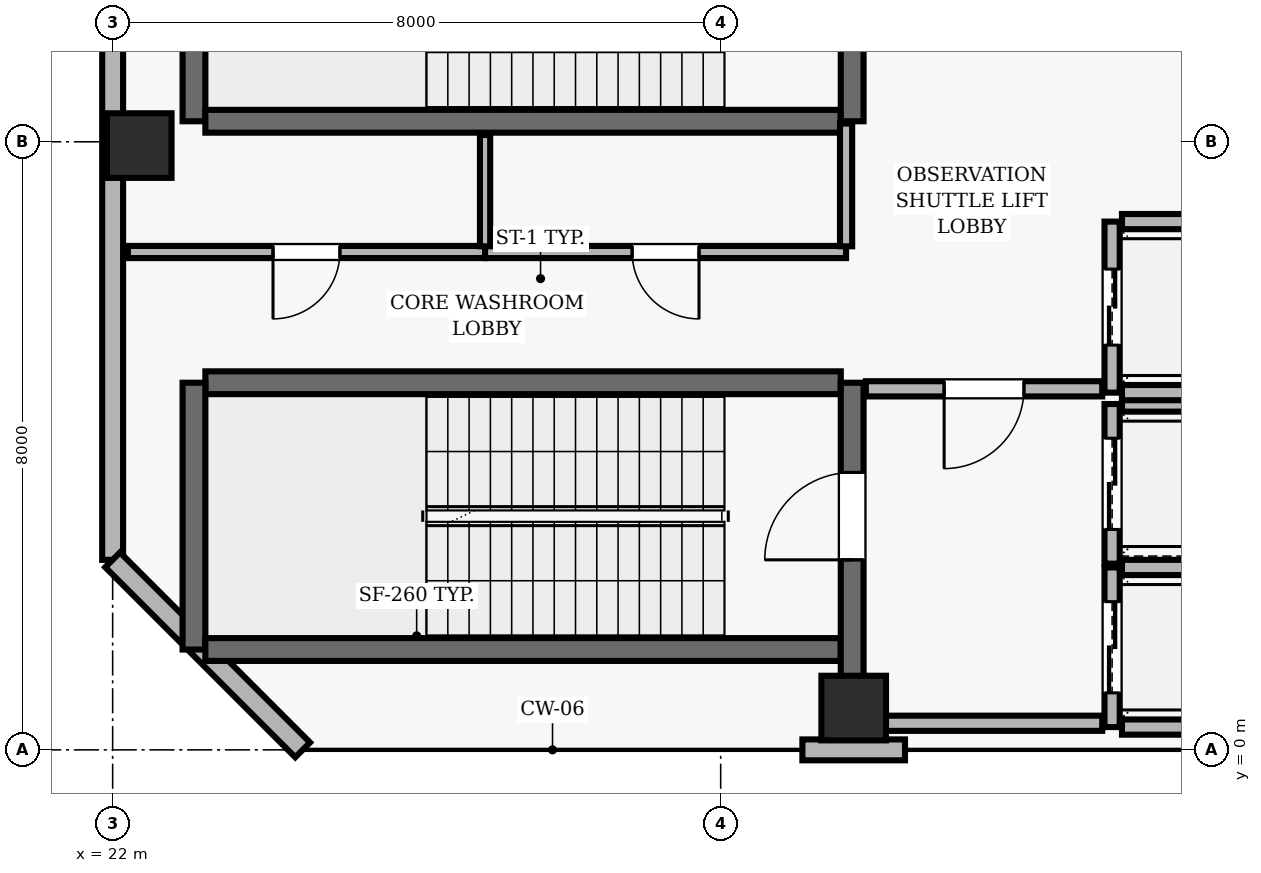
"""IFC4 building model, lengths in metres.
Left out: names, types, materials, properties, quantities, classifications, styles, units other than length and angle.
Written with IfcOpenShell. Run it as: python <this file> out.ifc"""

import sys

from ifc_helpers import new_model, si_unit, direction, frame, frame_2d, origin, origin_2d, place, context, subcontext, project, spatial, rectangle, extrude, element, fill, save


model = new_model("IFC4")
c1 = context("Model", 3, precision=1e-05, world=origin(), true_north=direction((0.0, 1.0)))
c2 = subcontext(c1, "Body", "Model", "MODEL_VIEW")
j1 = project(units=[si_unit("LENGTHUNIT", "METRE"), si_unit("PLANEANGLEUNIT", "RADIAN")], contexts=[c1])
p1 = place(None, origin())
s1 = spatial("IfcSite", under=j1, at=p1, CompositionType="ELEMENT")
p2 = place(p1, origin())
s2 = spatial("IfcBuilding", under=s1, at=p2, CompositionType="ELEMENT")
p3 = place(p2, frame((0.0, 0.0, 311.7)))
s3 = spatial("IfcBuildingStorey", under=s2, at=p3, CompositionType="ELEMENT", Elevation=311.7)
for number, where, z_axis, x_axis in (
    (1, (31.75, 0.55, 0.0), (0.0, 0.0, 1.0), (1.0, 0.0, 0.0)),
    (2, (22.35, 7.95, 0.0), (0.0, 0.0, 1.0), (1.0, 0.0, 0.0)),
):
    element("IfcColumn", number, at=place(p3, frame(where, z_axis=z_axis, x_axis=x_axis)), inside=s3, PredefinedType="COLUMN", context=c2, shape_type="SweptSolid", body=[
        extrude(rectangle(XDim=0.85, YDim=0.85, at=origin_2d()), origin(), (0.0, 0.0, 1.0), 5.0),
    ])
p4 = place(p3, frame((31.075, 0.0, 0.0), z_axis=(0.0, 0.0, 1.0), x_axis=(1.0, 0.0, 0.0)))
e3 = element("IfcWall", 3, at=p4, inside=s3, PredefinedType="SOLIDWALL", context=c2, shape_type="SweptSolid", body=[
    extrude(rectangle(XDim=1.35, YDim=0.275, at=frame_2d((0.675, 0.0))), origin(), (0.0, 0.0, 1.0), 4.74),
])
p5 = place(p3, frame((22.0, 35.3, 0.0), z_axis=(0.0, 0.0, 1.0), x_axis=(0.0, -1.0, 0.0)))
e4 = element("IfcWall", 4, at=p5, inside=s3, PredefinedType="SOLIDWALL", context=c2, shape_type="SweptSolid", body=[
    extrude(rectangle(XDim=32.8, YDim=0.275, at=frame_2d((16.4, 0.0))), origin(), (0.0, 0.0, 1.0), 4.74),
])
p6 = place(p5, frame((7.3, 0.0, 0.0)))
e5 = element("IfcOpeningElement", 5, at=p6, cuts=e4, PredefinedType="OPENING", context=c2, shape_type="SweptSolid", body=[
    extrude(rectangle(XDim=1.0, YDim=2.2, at=frame_2d((0.5, 1.1))), frame((0.0, 0.147, 0.0), z_axis=(0.0, -1.0, 0.0), x_axis=(1.0, 0.0, 0.0)), (0.0, 0.0, 1.0), 0.295),
])
p7 = place(p5, frame((1.533, 0.0, 0.9)))
e6 = element("IfcOpeningElement", 6, at=p7, cuts=e4, PredefinedType="OPENING", context=c2, shape_type="SweptSolid", body=[
    extrude(rectangle(XDim=2.4, YDim=1.6, at=frame_2d((1.2, 0.8))), frame((0.0, 0.147, 0.0), z_axis=(0.0, -1.0, 0.0), x_axis=(1.0, 0.0, 0.0)), (0.0, 0.0, 1.0), 0.295),
])
p8 = place(p5, frame((12.917, 0.0, 0.9)))
e7 = element("IfcOpeningElement", 7, at=p8, cuts=e4, PredefinedType="OPENING", context=c2, shape_type="SweptSolid", body=[
    extrude(rectangle(XDim=2.4, YDim=1.6, at=frame_2d((1.2, 0.8))), frame((0.0, 0.147, 0.0), z_axis=(0.0, -1.0, 0.0), x_axis=(1.0, 0.0, 0.0)), (0.0, 0.0, 1.0), 0.295),
])
p9 = place(p5, frame((17.483, 0.0, 0.9)))
e8 = element("IfcOpeningElement", 8, at=p9, cuts=e4, PredefinedType="OPENING", context=c2, shape_type="SweptSolid", body=[
    extrude(rectangle(XDim=2.4, YDim=1.6, at=frame_2d((1.2, 0.8))), frame((0.0, 0.147, 0.0), z_axis=(0.0, -1.0, 0.0), x_axis=(1.0, 0.0, 0.0)), (0.0, 0.0, 1.0), 0.295),
])
p10 = place(p5, frame((23.4, 0.0, 0.9)))
e9 = element("IfcOpeningElement", 9, at=p10, cuts=e4, PredefinedType="OPENING", context=c2, shape_type="SweptSolid", body=[
    extrude(rectangle(XDim=2.4, YDim=1.6, at=frame_2d((1.2, 0.8))), frame((0.0, 0.147, 0.0), z_axis=(0.0, -1.0, 0.0), x_axis=(1.0, 0.0, 0.0)), (0.0, 0.0, 1.0), 0.295),
])
p11 = place(p3, frame((22.0, 2.5, 0.0), z_axis=(0.0, 0.0, 1.0), x_axis=(0.707106781187, -0.707106781187, 0.0)))
e10 = element("IfcWall", 10, at=p11, inside=s3, PredefinedType="SOLIDWALL", context=c2, shape_type="SweptSolid", body=[
    extrude(rectangle(XDim=3.536, YDim=0.275, at=frame_2d((1.768, 0.0))), origin(), (0.0, 0.0, 1.0), 4.74),
])
p12 = place(p3, frame((31.58, 4.83, 0.0), z_axis=(0.0, 0.0, 1.0), x_axis=(-1.0, 0.0, 0.0)))
e11 = element("IfcWall", 11, at=p12, inside=s3, PredefinedType="SHEAR", context=c2, shape_type="SweptSolid", body=[
    extrude(rectangle(XDim=8.36, YDim=0.3, at=frame_2d((4.18, 0.0))), origin(), (0.0, 0.0, 1.0), 4.74),
])
p13 = place(p3, frame((23.07, 4.83, 0.0), z_axis=(0.0, 0.0, 1.0), x_axis=(0.0, -1.0, 0.0)))
e12 = element("IfcWall", 12, at=p13, inside=s3, PredefinedType="SHEAR", context=c2, shape_type="SweptSolid", body=[
    extrude(rectangle(XDim=3.51, YDim=0.3, at=frame_2d((1.755, 0.0))), origin(), (0.0, 0.0, 1.0), 4.74),
])
p14 = place(p3, frame((23.22, 1.32, 0.0), z_axis=(0.0, 0.0, 1.0), x_axis=(1.0, 0.0, 0.0)))
e13 = element("IfcWall", 13, at=p14, inside=s3, PredefinedType="SHEAR", context=c2, shape_type="SweptSolid", body=[
    extrude(rectangle(XDim=8.36, YDim=0.3, at=frame_2d((4.18, 0.0))), origin(), (0.0, 0.0, 1.0), 4.74),
])
p15 = place(p3, frame((31.73, 0.96, 0.0), z_axis=(0.0, 0.0, 1.0), x_axis=(0.0, 1.0, 0.0)))
e14 = element("IfcWall", 14, at=p15, inside=s3, PredefinedType="SHEAR", context=c2, shape_type="SweptSolid", body=[
    extrude(rectangle(XDim=3.87, YDim=0.3, at=frame_2d((1.935, 0.0))), origin(), (0.0, 0.0, 1.0), 4.74),
])
p16 = place(p15, frame((1.54, 0.0, 0.0)))
e15 = element("IfcOpeningElement", 15, at=p16, cuts=e14, PredefinedType="OPENING", context=c2, shape_type="SweptSolid", body=[
    extrude(rectangle(XDim=1.15, YDim=2.15, at=frame_2d((0.575, 1.075))), frame((0.0, 0.16, 0.0), z_axis=(0.0, -1.0, 0.0), x_axis=(1.0, 0.0, 0.0)), (0.0, 0.0, 1.0), 0.32),
])
p17 = place(p3, frame((23.07, 11.78, 0.0), z_axis=(0.0, 0.0, 1.0), x_axis=(0.0, -1.0, 0.0)))
e16 = element("IfcWall", 16, at=p17, inside=s3, PredefinedType="SHEAR", context=c2, shape_type="SweptSolid", body=[
    extrude(rectangle(XDim=3.51, YDim=0.3, at=frame_2d((1.755, 0.0))), origin(), (0.0, 0.0, 1.0), 4.74),
])
p18 = place(p3, frame((23.22, 8.27, 0.0), z_axis=(0.0, 0.0, 1.0), x_axis=(1.0, 0.0, 0.0)))
e17 = element("IfcWall", 17, at=p18, inside=s3, PredefinedType="SHEAR", context=c2, shape_type="SweptSolid", body=[
    extrude(rectangle(XDim=8.36, YDim=0.3, at=frame_2d((4.18, 0.0))), origin(), (0.0, 0.0, 1.0), 4.74),
])
p19 = place(p3, frame((31.73, 8.27, 0.0), z_axis=(0.0, 0.0, 1.0), x_axis=(0.0, 1.0, 0.0)))
e18 = element("IfcWall", 18, at=p19, inside=s3, PredefinedType="SHEAR", context=c2, shape_type="SweptSolid", body=[
    extrude(rectangle(XDim=3.51, YDim=0.3, at=frame_2d((1.755, 0.0))), origin(), (0.0, 0.0, 1.0), 4.74),
])
p20 = place(p19, frame((1.18, 0.0, 0.0)))
e19 = element("IfcOpeningElement", 19, at=p20, cuts=e18, PredefinedType="OPENING", context=c2, shape_type="SweptSolid", body=[
    extrude(rectangle(XDim=1.15, YDim=2.15, at=frame_2d((0.575, 1.075))), frame((0.0, 0.16, 0.0), z_axis=(0.0, -1.0, 0.0), x_axis=(1.0, 0.0, 0.0)), (0.0, 0.0, 1.0), 0.32),
])
p21 = place(p3, frame((35.15, 2.4, 0.0), z_axis=(0.0, 0.0, 1.0), x_axis=(0.0, -1.0, 0.0)))
e20 = element("IfcWall", 20, at=p21, inside=s3, PredefinedType="SOLIDWALL", context=c2, shape_type="SweptSolid", body=[
    extrude(rectangle(XDim=2.1, YDim=0.2, at=frame_2d((1.05, 0.0))), origin(), (0.0, 0.0, 1.0), 4.74),
])
p22 = place(p21, frame((0.45, 0.0, 0.0)))
e21 = element("IfcOpeningElement", 21, at=p22, cuts=e20, PredefinedType="OPENING", context=c2, shape_type="SweptSolid", body=[
    extrude(rectangle(XDim=1.2, YDim=2.15, at=frame_2d((0.6, 1.075))), frame((0.0, 0.11, 0.0), z_axis=(0.0, -1.0, 0.0), x_axis=(1.0, 0.0, 0.0)), (0.0, 0.0, 1.0), 0.22),
])
for number, where, z_axis, x_axis in (
    (22, (35.28, 0.3, 0.0), (0.0, 0.0, 1.0), (1.0, 0.0, 0.0)),
    (23, (37.42, 2.4, 0.0), (0.0, 0.0, 1.0), (-1.0, 0.0, 0.0)),
):
    element("IfcWall", number, at=place(p3, frame(where, z_axis=z_axis, x_axis=x_axis)), inside=s3, PredefinedType="SOLIDWALL", context=c2, shape_type="SweptSolid", body=[
        extrude(rectangle(XDim=2.14, YDim=0.2, at=frame_2d((1.07, 0.0))), origin(), (0.0, 0.0, 1.0), 4.74),
    ])
p23 = place(p3, frame((35.15, 4.55, 0.0), z_axis=(0.0, 0.0, 1.0), x_axis=(0.0, -1.0, 0.0)))
e24 = element("IfcWall", 24, at=p23, inside=s3, PredefinedType="SOLIDWALL", context=c2, shape_type="SweptSolid", body=[
    extrude(rectangle(XDim=2.1, YDim=0.2, at=frame_2d((1.05, 0.0))), origin(), (0.0, 0.0, 1.0), 4.74),
])
p24 = place(p23, frame((0.45, 0.0, 0.0)))
e25 = element("IfcOpeningElement", 25, at=p24, cuts=e24, PredefinedType="OPENING", context=c2, shape_type="SweptSolid", body=[
    extrude(rectangle(XDim=1.2, YDim=2.15, at=frame_2d((0.6, 1.075))), frame((0.0, 0.11, 0.0), z_axis=(0.0, -1.0, 0.0), x_axis=(1.0, 0.0, 0.0)), (0.0, 0.0, 1.0), 0.22),
])
p25 = place(p3, frame((37.42, 4.55, 0.0), z_axis=(0.0, 0.0, 1.0), x_axis=(-1.0, 0.0, 0.0)))
e26 = element("IfcWall", 26, at=p25, inside=s3, PredefinedType="SOLIDWALL", context=c2, shape_type="SweptSolid", body=[
    extrude(rectangle(XDim=2.14, YDim=0.2, at=frame_2d((1.07, 0.0))), origin(), (0.0, 0.0, 1.0), 4.74),
])
p26 = place(p3, frame((35.15, 6.95, 0.0), z_axis=(0.0, 0.0, 1.0), x_axis=(0.0, -1.0, 0.0)))
e27 = element("IfcWall", 27, at=p26, inside=s3, PredefinedType="SOLIDWALL", context=c2, shape_type="SweptSolid", body=[
    extrude(rectangle(XDim=2.25, YDim=0.2, at=frame_2d((1.125, 0.0))), origin(), (0.0, 0.0, 1.0), 4.74),
])
p27 = place(p26, frame((0.625, 0.0, 0.0)))
e28 = element("IfcOpeningElement", 28, at=p27, cuts=e27, PredefinedType="OPENING", context=c2, shape_type="SweptSolid", body=[
    extrude(rectangle(XDim=1.0, YDim=2.1, at=frame_2d((0.5, 1.05))), frame((0.0, 0.11, 0.0), z_axis=(0.0, -1.0, 0.0), x_axis=(1.0, 0.0, 0.0)), (0.0, 0.0, 1.0), 0.22),
])
for number, where, z_axis, x_axis in (
    (29, (35.28, 4.7, 0.0), (0.0, 0.0, 1.0), (1.0, 0.0, 0.0)),
    (30, (37.42, 6.95, 0.0), (0.0, 0.0, 1.0), (-1.0, 0.0, 0.0)),
):
    element("IfcWall", number, at=place(p3, frame(where, z_axis=z_axis, x_axis=x_axis)), inside=s3, PredefinedType="SOLIDWALL", context=c2, shape_type="SweptSolid", body=[
        extrude(rectangle(XDim=2.14, YDim=0.2, at=frame_2d((1.07, 0.0))), origin(), (0.0, 0.0, 1.0), 4.74),
    ])
p28 = place(p3, frame((26.9, 6.55, 0.0), z_axis=(0.0, 0.0, 1.0), x_axis=(-1.0, 0.0, 0.0)))
e31 = element("IfcWall", 31, at=p28, inside=s3, PredefinedType="PARTITIONING", context=c2, shape_type="SweptSolid", body=[
    extrude(rectangle(XDim=4.7, YDim=0.16, at=frame_2d((2.35, 0.0))), origin(), (0.0, 0.0, 1.0), 4.74),
])
p29 = place(p28, frame((1.91, 0.0, 0.0)))
e32 = element("IfcOpeningElement", 32, at=p29, cuts=e31, PredefinedType="OPENING", context=c2, shape_type="SweptSolid", body=[
    extrude(rectangle(XDim=0.88, YDim=2.1, at=frame_2d((0.44, 1.05))), frame((0.0, 0.09, 0.0), z_axis=(0.0, -1.0, 0.0), x_axis=(1.0, 0.0, 0.0)), (0.0, 0.0, 1.0), 0.18),
])
p30 = place(p3, frame((31.65, 0.35, 0.0), z_axis=(0.0, 0.0, 1.0), x_axis=(1.0, 0.0, 0.0)))
e33 = element("IfcWall", 33, at=p30, inside=s3, PredefinedType="SOLIDWALL", context=c2, shape_type="SweptSolid", body=[
    extrude(rectangle(XDim=3.37, YDim=0.2, at=frame_2d((1.685, 0.0))), origin(), (0.0, 0.0, 1.0), 4.74),
])
p31 = place(p3, frame((31.65, 6.55, 0.0), z_axis=(0.0, 0.0, 1.0), x_axis=(-1.0, 0.0, 0.0)))
e34 = element("IfcWall", 34, at=p31, inside=s3, PredefinedType="PARTITIONING", context=c2, shape_type="SweptSolid", body=[
    extrude(rectangle(XDim=4.75, YDim=0.16, at=frame_2d((2.375, 0.0))), origin(), (0.0, 0.0, 1.0), 4.74),
])
p32 = place(p31, frame((1.935, 0.0, 0.0)))
e35 = element("IfcOpeningElement", 35, at=p32, cuts=e34, PredefinedType="OPENING", context=c2, shape_type="SweptSolid", body=[
    extrude(rectangle(XDim=0.88, YDim=2.1, at=frame_2d((0.44, 1.05))), frame((0.0, 0.09, 0.0), z_axis=(0.0, -1.0, 0.0), x_axis=(1.0, 0.0, 0.0)), (0.0, 0.0, 1.0), 0.18),
])
p33 = place(p3, frame((35.02, 4.75, 0.0), z_axis=(0.0, 0.0, 1.0), x_axis=(-1.0, 0.0, 0.0)))
e36 = element("IfcWall", 36, at=p33, inside=s3, PredefinedType="SOLIDWALL", context=c2, shape_type="SweptSolid", body=[
    extrude(rectangle(XDim=3.11, YDim=0.2, at=frame_2d((1.555, 0.0))), origin(), (0.0, 0.0, 1.0), 4.74),
])
p34 = place(p33, frame((1.03, 0.0, 0.0)))
e37 = element("IfcOpeningElement", 37, at=p34, cuts=e36, PredefinedType="OPENING", context=c2, shape_type="SweptSolid", body=[
    extrude(rectangle(XDim=1.05, YDim=2.15, at=frame_2d((0.525, 1.075))), frame((0.0, 0.11, 0.0), z_axis=(0.0, -1.0, 0.0), x_axis=(1.0, 0.0, 0.0)), (0.0, 0.0, 1.0), 0.22),
])
p35 = place(p3, frame((26.9, 6.625, 0.0), z_axis=(0.0, 0.0, 1.0), x_axis=(0.0, 1.0, 0.0)))
e38 = element("IfcWall", 38, at=p35, inside=s3, PredefinedType="PARTITIONING", context=c2, shape_type="SweptSolid", body=[
    extrude(rectangle(XDim=1.465, YDim=0.135, at=frame_2d((0.732, 0.0))), origin(), (0.0, 0.0, 1.0), 4.74),
])
p36 = place(p3, frame((31.65, 8.24, 0.0), z_axis=(0.0, 0.0, 1.0), x_axis=(0.0, -1.0, 0.0)))
e39 = element("IfcWall", 39, at=p36, inside=s3, PredefinedType="PARTITIONING", context=c2, shape_type="SweptSolid", body=[
    extrude(rectangle(XDim=1.615, YDim=0.16, at=frame_2d((0.808, 0.0))), origin(), (0.0, 0.0, 1.0), 4.74),
])
p37 = place(p16, origin())
e40 = element("IfcDoor", 40, at=p37, inside=s3, OperationType="SINGLE_SWING_LEFT", PredefinedType="DOOR", context=c2, shape_type="SweptSolid", body=[
    extrude(rectangle(XDim=1.15, YDim=2.15, at=frame_2d((0.575, 1.075))), frame((0.0, 0.025, 0.0), z_axis=(0.0, -1.0, 0.0), x_axis=(1.0, 0.0, 0.0)), (0.0, 0.0, 1.0), 0.05),
])
fill(e15, e40)
p38 = place(p22, origin())
e41 = element("IfcDoor", 41, at=p38, inside=s3, OperationType="DOUBLE_DOOR_SLIDING", PredefinedType="DOOR", context=c2, shape_type="SweptSolid", body=[
    extrude(rectangle(XDim=1.2, YDim=2.15, at=frame_2d((0.6, 1.075))), frame((0.0, 0.025, 0.0), z_axis=(0.0, -1.0, 0.0), x_axis=(1.0, 0.0, 0.0)), (0.0, 0.0, 1.0), 0.05),
])
fill(e21, e41)
p39 = place(p24, origin())
e42 = element("IfcDoor", 42, at=p39, inside=s3, OperationType="DOUBLE_DOOR_SLIDING", PredefinedType="DOOR", context=c2, shape_type="SweptSolid", body=[
    extrude(rectangle(XDim=1.2, YDim=2.15, at=frame_2d((0.6, 1.075))), frame((0.0, 0.025, 0.0), z_axis=(0.0, -1.0, 0.0), x_axis=(1.0, 0.0, 0.0)), (0.0, 0.0, 1.0), 0.05),
])
fill(e25, e42)
p40 = place(p27, origin())
e43 = element("IfcDoor", 43, at=p40, inside=s3, OperationType="DOUBLE_DOOR_SLIDING", PredefinedType="DOOR", context=c2, shape_type="SweptSolid", body=[
    extrude(rectangle(XDim=1.0, YDim=2.1, at=frame_2d((0.5, 1.05))), frame((0.0, 0.025, 0.0), z_axis=(0.0, -1.0, 0.0), x_axis=(1.0, 0.0, 0.0)), (0.0, 0.0, 1.0), 0.05),
])
fill(e28, e43)
p41 = place(p34, origin())
e44 = element("IfcDoor", 44, at=p41, inside=s3, OperationType="SINGLE_SWING_RIGHT", PredefinedType="DOOR", context=c2, shape_type="SweptSolid", body=[
    extrude(rectangle(XDim=1.05, YDim=2.15, at=frame_2d((0.525, 1.075))), frame((0.0, 0.025, 0.0), z_axis=(0.0, -1.0, 0.0), x_axis=(1.0, 0.0, 0.0)), (0.0, 0.0, 1.0), 0.05),
])
fill(e37, e44)
p42 = place(p29, origin())
e45 = element("IfcDoor", 45, at=p42, inside=s3, OperationType="SINGLE_SWING_RIGHT", PredefinedType="DOOR", context=c2, shape_type="SweptSolid", body=[
    extrude(rectangle(XDim=0.88, YDim=2.1, at=frame_2d((0.44, 1.05))), frame((0.0, 0.025, 0.0), z_axis=(0.0, -1.0, 0.0), x_axis=(1.0, 0.0, 0.0)), (0.0, 0.0, 1.0), 0.05),
])
fill(e32, e45)
p43 = place(p32, origin())
e46 = element("IfcDoor", 46, at=p43, inside=s3, OperationType="SINGLE_SWING_LEFT", PredefinedType="DOOR", context=c2, shape_type="SweptSolid", body=[
    extrude(rectangle(XDim=0.88, YDim=2.1, at=frame_2d((0.44, 1.05))), frame((0.0, 0.025, 0.0), z_axis=(0.0, -1.0, 0.0), x_axis=(1.0, 0.0, 0.0)), (0.0, 0.0, 1.0), 0.05),
])
fill(e35, e46)
save(model, sys.argv[1])
